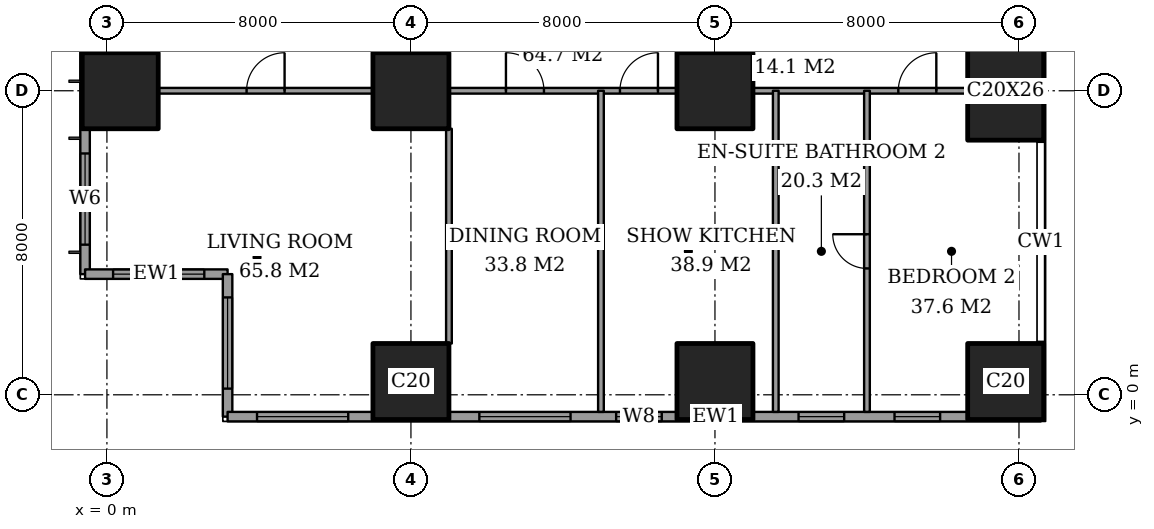
"""IFC4 building model, lengths in metres.
Left out: names, types, materials, properties, quantities, classifications, styles, units other than length and angle.
Written with IfcOpenShell. Run it as: python <this file> out.ifc"""

import sys

from ifc_helpers import new_model, si_unit, direction, frame, frame_2d, origin, origin_2d, place, context, subcontext, project, spatial, rectangle, extrude, element, fill, save


model = new_model("IFC4")
c1 = context("Model", 3, precision=1e-05, world=origin(), true_north=direction((0.0, 1.0)))
c2 = subcontext(c1, "Body", "Model", "MODEL_VIEW")
j1 = project(units=[si_unit("LENGTHUNIT", "METRE"), si_unit("PLANEANGLEUNIT", "RADIAN")], contexts=[c1])
p1 = place(None, origin())
s1 = spatial("IfcSite", under=j1, at=p1, CompositionType="ELEMENT")
p2 = place(p1, origin())
s2 = spatial("IfcBuilding", under=s1, at=p2, CompositionType="ELEMENT")
p3 = place(p2, frame((0.0, 0.0, 40.4)))
s3 = spatial("IfcBuildingStorey", under=s2, at=p3, CompositionType="ELEMENT", Elevation=40.4)
for number, where, z_axis, x_axis in (
    (1, (0.35, 8.0, 0.0), (0.0, 0.0, 1.0), (1.0, 0.0, 0.0)),
    (2, (8.0, 0.35, 0.0), (0.0, 0.0, 1.0), (1.0, 0.0, 0.0)),
    (3, (8.0, 8.0, 0.0), (0.0, 0.0, 1.0), (1.0, 0.0, 0.0)),
    (4, (16.0, 0.35, 0.0), (0.0, 0.0, 1.0), (1.0, 0.0, 0.0)),
    (5, (16.0, 8.0, 0.0), (0.0, 0.0, 1.0), (1.0, 0.0, 0.0)),
    (6, (23.65, 0.35, 0.0), (0.0, 0.0, 1.0), (1.0, 0.0, 0.0)),
):
    element("IfcColumn", number, at=place(p3, frame(where, z_axis=z_axis, x_axis=x_axis)), inside=s3, PredefinedType="COLUMN", context=c2, shape_type="SweptSolid", body=[
        extrude(rectangle(XDim=2.0, YDim=2.0, at=origin_2d()), origin(), (0.0, 0.0, 1.0), 3.6),
    ])
p4 = place(p3, frame((23.65, 8.0, 0.0), z_axis=(0.0, 0.0, 1.0), x_axis=(1.0, 0.0, 0.0)))
e7 = element("IfcColumn", 7, at=p4, inside=s3, PredefinedType="COLUMN", context=c2, shape_type="SweptSolid", body=[
    extrude(rectangle(XDim=2.0, YDim=2.6, at=origin_2d()), origin(), (0.0, 0.0, 1.0), 3.6),
])
p5 = place(p3, frame((-0.575, 44.825, 0.0), z_axis=(0.0, 0.0, 1.0), x_axis=(0.0, -1.0, 0.0)))
e8 = element("IfcWall", 8, at=p5, inside=s3, PredefinedType="SOLIDWALL", context=c2, shape_type="SweptSolid", body=[
    extrude(rectangle(XDim=41.65, YDim=0.25, at=frame_2d((20.825, 0.0))), origin(), (0.0, 0.0, 1.0), 3.6),
])
p6 = place(p5, frame((0.775, 0.0, 0.6)))
e9 = element("IfcOpeningElement", 9, at=p6, cuts=e8, PredefinedType="OPENING", context=c2, shape_type="SweptSolid", body=[
    extrude(rectangle(XDim=2.4, YDim=2.0, at=frame_2d((1.2, 1.0))), frame((0.0, 0.135, 0.0), z_axis=(0.0, -1.0, 0.0), x_axis=(1.0, 0.0, 0.0)), (0.0, 0.0, 1.0), 0.27),
])
p7 = place(p5, frame((6.1, 0.0, 0.6)))
e10 = element("IfcOpeningElement", 10, at=p7, cuts=e8, PredefinedType="OPENING", context=c2, shape_type="SweptSolid", body=[
    extrude(rectangle(XDim=1.2, YDim=2.0, at=frame_2d((0.6, 1.0))), frame((0.0, 0.135, 0.0), z_axis=(0.0, -1.0, 0.0), x_axis=(1.0, 0.0, 0.0)), (0.0, 0.0, 1.0), 0.27),
])
p8 = place(p5, frame((8.425, 0.0, 0.6)))
e11 = element("IfcOpeningElement", 11, at=p8, cuts=e8, PredefinedType="OPENING", context=c2, shape_type="SweptSolid", body=[
    extrude(rectangle(XDim=2.4, YDim=2.0, at=frame_2d((1.2, 1.0))), frame((0.0, 0.135, 0.0), z_axis=(0.0, -1.0, 0.0), x_axis=(1.0, 0.0, 0.0)), (0.0, 0.0, 1.0), 0.27),
])
p9 = place(p5, frame((15.625, 0.0, 0.6)))
e12 = element("IfcOpeningElement", 12, at=p9, cuts=e8, PredefinedType="OPENING", context=c2, shape_type="SweptSolid", body=[
    extrude(rectangle(XDim=2.4, YDim=2.0, at=frame_2d((1.2, 1.0))), frame((0.0, 0.135, 0.0), z_axis=(0.0, -1.0, 0.0), x_axis=(1.0, 0.0, 0.0)), (0.0, 0.0, 1.0), 0.27),
])
p10 = place(p5, frame((23.625, 0.0, 0.6)))
e13 = element("IfcOpeningElement", 13, at=p10, cuts=e8, PredefinedType="OPENING", context=c2, shape_type="SweptSolid", body=[
    extrude(rectangle(XDim=2.4, YDim=2.0, at=frame_2d((1.2, 1.0))), frame((0.0, 0.135, 0.0), z_axis=(0.0, -1.0, 0.0), x_axis=(1.0, 0.0, 0.0)), (0.0, 0.0, 1.0), 0.27),
])
p11 = place(p5, frame((30.825, 0.0, 0.6)))
e14 = element("IfcOpeningElement", 14, at=p11, cuts=e8, PredefinedType="OPENING", context=c2, shape_type="SweptSolid", body=[
    extrude(rectangle(XDim=2.4, YDim=2.0, at=frame_2d((1.2, 1.0))), frame((0.0, 0.135, 0.0), z_axis=(0.0, -1.0, 0.0), x_axis=(1.0, 0.0, 0.0)), (0.0, 0.0, 1.0), 0.27),
])
p12 = place(p5, frame((34.5, 0.0, 0.6)))
e15 = element("IfcOpeningElement", 15, at=p12, cuts=e8, PredefinedType="OPENING", context=c2, shape_type="SweptSolid", body=[
    extrude(rectangle(XDim=1.2, YDim=2.0, at=frame_2d((0.6, 1.0))), frame((0.0, 0.135, 0.0), z_axis=(0.0, -1.0, 0.0), x_axis=(1.0, 0.0, 0.0)), (0.0, 0.0, 1.0), 0.27),
])
p13 = place(p5, frame((38.475, 0.0, 0.6)))
e16 = element("IfcOpeningElement", 16, at=p13, cuts=e8, PredefinedType="OPENING", context=c2, shape_type="SweptSolid", body=[
    extrude(rectangle(XDim=2.4, YDim=2.0, at=frame_2d((1.2, 1.0))), frame((0.0, 0.135, 0.0), z_axis=(0.0, -1.0, 0.0), x_axis=(1.0, 0.0, 0.0)), (0.0, 0.0, 1.0), 0.27),
])
p14 = place(p3, frame((-0.575, 3.175, 0.0), z_axis=(0.0, 0.0, 1.0), x_axis=(1.0, 0.0, 0.0)))
e17 = element("IfcWall", 17, at=p14, inside=s3, PredefinedType="SOLIDWALL", context=c2, shape_type="SweptSolid", body=[
    extrude(rectangle(XDim=3.75, YDim=0.25, at=frame_2d((1.875, 0.0))), origin(), (0.0, 0.0, 1.0), 3.6),
])
p15 = place(p14, frame((0.738, 0.0, 0.6)))
e18 = element("IfcOpeningElement", 18, at=p15, cuts=e17, PredefinedType="OPENING", context=c2, shape_type="SweptSolid", body=[
    extrude(rectangle(XDim=2.4, YDim=2.0, at=frame_2d((1.2, 1.0))), frame((0.0, 0.135, 0.0), z_axis=(0.0, -1.0, 0.0), x_axis=(1.0, 0.0, 0.0)), (0.0, 0.0, 1.0), 0.27),
])
p16 = place(p3, frame((3.175, 3.175, 0.0), z_axis=(0.0, 0.0, 1.0), x_axis=(0.0, -1.0, 0.0)))
e19 = element("IfcWall", 19, at=p16, inside=s3, PredefinedType="SOLIDWALL", context=c2, shape_type="SweptSolid", body=[
    extrude(rectangle(XDim=3.75, YDim=0.25, at=frame_2d((1.875, 0.0))), origin(), (0.0, 0.0, 1.0), 3.6),
])
p17 = place(p16, frame((0.613, 0.0, 0.6)))
e20 = element("IfcOpeningElement", 20, at=p17, cuts=e19, PredefinedType="OPENING", context=c2, shape_type="SweptSolid", body=[
    extrude(rectangle(XDim=2.4, YDim=2.0, at=frame_2d((1.2, 1.0))), frame((0.0, 0.135, 0.0), z_axis=(0.0, -1.0, 0.0), x_axis=(1.0, 0.0, 0.0)), (0.0, 0.0, 1.0), 0.27),
])
p18 = place(p3, frame((3.175, -0.575, 0.0), z_axis=(0.0, 0.0, 1.0), x_axis=(1.0, 0.0, 0.0)))
e21 = element("IfcWall", 21, at=p18, inside=s3, PredefinedType="SOLIDWALL", context=c2, shape_type="SweptSolid", body=[
    extrude(rectangle(XDim=21.4, YDim=0.25, at=frame_2d((10.7, 0.0))), origin(), (0.0, 0.0, 1.0), 3.6),
])
p19 = place(p18, frame((0.775, 0.0, 0.6)))
e22 = element("IfcOpeningElement", 22, at=p19, cuts=e21, PredefinedType="OPENING", context=c2, shape_type="SweptSolid", body=[
    extrude(rectangle(XDim=2.4, YDim=2.0, at=frame_2d((1.2, 1.0))), frame((0.0, 0.135, 0.0), z_axis=(0.0, -1.0, 0.0), x_axis=(1.0, 0.0, 0.0)), (0.0, 0.0, 1.0), 0.27),
])
p20 = place(p18, frame((6.625, 0.0, 0.6)))
e23 = element("IfcOpeningElement", 23, at=p20, cuts=e21, PredefinedType="OPENING", context=c2, shape_type="SweptSolid", body=[
    extrude(rectangle(XDim=2.4, YDim=2.0, at=frame_2d((1.2, 1.0))), frame((0.0, 0.135, 0.0), z_axis=(0.0, -1.0, 0.0), x_axis=(1.0, 0.0, 0.0)), (0.0, 0.0, 1.0), 0.27),
])
p21 = place(p18, frame((10.225, 0.0, 0.6)))
e24 = element("IfcOpeningElement", 24, at=p21, cuts=e21, PredefinedType="OPENING", context=c2, shape_type="SweptSolid", body=[
    extrude(rectangle(XDim=1.2, YDim=2.0, at=frame_2d((0.6, 1.0))), frame((0.0, 0.135, 0.0), z_axis=(0.0, -1.0, 0.0), x_axis=(1.0, 0.0, 0.0)), (0.0, 0.0, 1.0), 0.27),
])
p22 = place(p18, frame((15.025, 0.0, 0.6)))
e25 = element("IfcOpeningElement", 25, at=p22, cuts=e21, PredefinedType="OPENING", context=c2, shape_type="SweptSolid", body=[
    extrude(rectangle(XDim=1.2, YDim=2.0, at=frame_2d((0.6, 1.0))), frame((0.0, 0.135, 0.0), z_axis=(0.0, -1.0, 0.0), x_axis=(1.0, 0.0, 0.0)), (0.0, 0.0, 1.0), 0.27),
])
p23 = place(p18, frame((17.55, 0.0, 0.6)))
e26 = element("IfcOpeningElement", 26, at=p23, cuts=e21, PredefinedType="OPENING", context=c2, shape_type="SweptSolid", body=[
    extrude(rectangle(XDim=1.2, YDim=2.0, at=frame_2d((0.6, 1.0))), frame((0.0, 0.135, 0.0), z_axis=(0.0, -1.0, 0.0), x_axis=(1.0, 0.0, 0.0)), (0.0, 0.0, 1.0), 0.27),
])
p24 = place(p3, frame((1.35, 8.0, 0.0), z_axis=(0.0, 0.0, 1.0), x_axis=(1.0, 0.0, 0.0)))
e27 = element("IfcWall", 27, at=p24, inside=s3, PredefinedType="PARTITIONING", context=c2, shape_type="SweptSolid", body=[
    extrude(rectangle(XDim=5.65, YDim=0.15, at=frame_2d((2.825, 0.0))), origin(), (0.0, 0.0, 1.0), 3.35),
])
p25 = place(p24, frame((2.325, 0.0, 0.0)))
e28 = element("IfcOpeningElement", 28, at=p25, cuts=e27, PredefinedType="OPENING", context=c2, shape_type="SweptSolid", body=[
    extrude(rectangle(XDim=1.0, YDim=2.1, at=frame_2d((0.5, 1.05))), frame((0.0, 0.085, 0.0), z_axis=(0.0, -1.0, 0.0), x_axis=(1.0, 0.0, 0.0)), (0.0, 0.0, 1.0), 0.17),
])
p26 = place(p3, frame((9.0, 8.0, 0.0), z_axis=(0.0, 0.0, 1.0), x_axis=(1.0, 0.0, 0.0)))
e29 = element("IfcWall", 29, at=p26, inside=s3, PredefinedType="PARTITIONING", context=c2, shape_type="SweptSolid", body=[
    extrude(rectangle(XDim=6.0, YDim=0.15, at=frame_2d((3.0, 0.0))), origin(), (0.0, 0.0, 1.0), 3.35),
])
p27 = place(p26, frame((1.5, 0.0, 0.0)))
e30 = element("IfcOpeningElement", 30, at=p27, cuts=e29, PredefinedType="OPENING", context=c2, shape_type="SweptSolid", body=[
    extrude(rectangle(XDim=1.0, YDim=2.1, at=frame_2d((0.5, 1.05))), frame((0.0, 0.085, 0.0), z_axis=(0.0, -1.0, 0.0), x_axis=(1.0, 0.0, 0.0)), (0.0, 0.0, 1.0), 0.17),
])
p28 = place(p26, frame((4.5, 0.0, 0.0)))
e31 = element("IfcOpeningElement", 31, at=p28, cuts=e29, PredefinedType="OPENING", context=c2, shape_type="SweptSolid", body=[
    extrude(rectangle(XDim=1.0, YDim=2.1, at=frame_2d((0.5, 1.05))), frame((0.0, 0.085, 0.0), z_axis=(0.0, -1.0, 0.0), x_axis=(1.0, 0.0, 0.0)), (0.0, 0.0, 1.0), 0.17),
])
p29 = place(p3, frame((17.0, 8.0, 0.0), z_axis=(0.0, 0.0, 1.0), x_axis=(1.0, 0.0, 0.0)))
e32 = element("IfcWall", 32, at=p29, inside=s3, PredefinedType="PARTITIONING", context=c2, shape_type="SweptSolid", body=[
    extrude(rectangle(XDim=5.65, YDim=0.15, at=frame_2d((2.825, 0.0))), origin(), (0.0, 0.0, 1.0), 3.35),
])
p30 = place(p29, frame((3.825, 0.0, 0.0)))
e33 = element("IfcOpeningElement", 33, at=p30, cuts=e32, PredefinedType="OPENING", context=c2, shape_type="SweptSolid", body=[
    extrude(rectangle(XDim=1.0, YDim=2.1, at=frame_2d((0.5, 1.05))), frame((0.0, 0.085, 0.0), z_axis=(0.0, -1.0, 0.0), x_axis=(1.0, 0.0, 0.0)), (0.0, 0.0, 1.0), 0.17),
])
p31 = place(p3, frame((9.0, 1.35, 0.0), z_axis=(0.0, 0.0, 1.0), x_axis=(0.0, 1.0, 0.0)))
e34 = element("IfcWall", 34, at=p31, inside=s3, PredefinedType="PARTITIONING", context=c2, shape_type="SweptSolid", body=[
    extrude(rectangle(XDim=5.65, YDim=0.15, at=frame_2d((2.825, 0.0))), origin(), (0.0, 0.0, 1.0), 3.35),
])
for number, where, z_axis, x_axis in (
    (35, (13.0, -0.45, 0.0), (0.0, 0.0, 1.0), (0.0, 1.0, 0.0)),
    (36, (17.6, -0.45, 0.0), (0.0, 0.0, 1.0), (0.0, 1.0, 0.0)),
):
    element("IfcWall", number, at=place(p3, frame(where, z_axis=z_axis, x_axis=x_axis)), inside=s3, PredefinedType="PARTITIONING", context=c2, shape_type="SweptSolid", body=[
        extrude(rectangle(XDim=8.45, YDim=0.15, at=frame_2d((4.225, 0.0))), origin(), (0.0, 0.0, 1.0), 3.35),
    ])
p32 = place(p3, frame((20.0, -0.45, 0.0), z_axis=(0.0, 0.0, 1.0), x_axis=(0.0, 1.0, 0.0)))
e37 = element("IfcWall", 37, at=p32, inside=s3, PredefinedType="PARTITIONING", context=c2, shape_type="SweptSolid", body=[
    extrude(rectangle(XDim=8.45, YDim=0.15, at=frame_2d((4.225, 0.0))), origin(), (0.0, 0.0, 1.0), 3.35),
])
p33 = place(p32, frame((3.775, 0.0, 0.0)))
e38 = element("IfcOpeningElement", 38, at=p33, cuts=e37, PredefinedType="OPENING", context=c2, shape_type="SweptSolid", body=[
    extrude(rectangle(XDim=0.9, YDim=2.1, at=frame_2d((0.45, 1.05))), frame((0.0, 0.085, 0.0), z_axis=(0.0, -1.0, 0.0), x_axis=(1.0, 0.0, 0.0)), (0.0, 0.0, 1.0), 0.17),
])
p34 = place(p13, origin())
e39 = element("IfcWindow", 39, at=p34, inside=s3, PartitioningType="SINGLE_PANEL", PredefinedType="WINDOW", context=c2, shape_type="SweptSolid", body=[
    extrude(rectangle(XDim=2.4, YDim=2.0, at=frame_2d((1.2, 1.0))), frame((0.0, 0.03, 0.0), z_axis=(0.0, -1.0, 0.0), x_axis=(1.0, 0.0, 0.0)), (0.0, 0.0, 1.0), 0.06),
])
fill(e16, e39)
p35 = place(p15, origin())
e40 = element("IfcWindow", 40, at=p35, inside=s3, PartitioningType="SINGLE_PANEL", PredefinedType="WINDOW", context=c2, shape_type="SweptSolid", body=[
    extrude(rectangle(XDim=2.4, YDim=2.0, at=frame_2d((1.2, 1.0))), frame((0.0, 0.03, 0.0), z_axis=(0.0, -1.0, 0.0), x_axis=(1.0, 0.0, 0.0)), (0.0, 0.0, 1.0), 0.06),
])
fill(e18, e40)
p36 = place(p17, origin())
e41 = element("IfcWindow", 41, at=p36, inside=s3, PartitioningType="SINGLE_PANEL", PredefinedType="WINDOW", context=c2, shape_type="SweptSolid", body=[
    extrude(rectangle(XDim=2.4, YDim=2.0, at=frame_2d((1.2, 1.0))), frame((0.0, 0.03, 0.0), z_axis=(0.0, -1.0, 0.0), x_axis=(1.0, 0.0, 0.0)), (0.0, 0.0, 1.0), 0.06),
])
fill(e20, e41)
p37 = place(p19, origin())
e42 = element("IfcWindow", 42, at=p37, inside=s3, PartitioningType="SINGLE_PANEL", PredefinedType="WINDOW", context=c2, shape_type="SweptSolid", body=[
    extrude(rectangle(XDim=2.4, YDim=2.0, at=frame_2d((1.2, 1.0))), frame((0.0, 0.03, 0.0), z_axis=(0.0, -1.0, 0.0), x_axis=(1.0, 0.0, 0.0)), (0.0, 0.0, 1.0), 0.06),
])
fill(e22, e42)
p38 = place(p20, origin())
e43 = element("IfcWindow", 43, at=p38, inside=s3, PartitioningType="SINGLE_PANEL", PredefinedType="WINDOW", context=c2, shape_type="SweptSolid", body=[
    extrude(rectangle(XDim=2.4, YDim=2.0, at=frame_2d((1.2, 1.0))), frame((0.0, 0.03, 0.0), z_axis=(0.0, -1.0, 0.0), x_axis=(1.0, 0.0, 0.0)), (0.0, 0.0, 1.0), 0.06),
])
fill(e23, e43)
p39 = place(p21, origin())
e44 = element("IfcWindow", 44, at=p39, inside=s3, PartitioningType="SINGLE_PANEL", PredefinedType="WINDOW", context=c2, shape_type="SweptSolid", body=[
    extrude(rectangle(XDim=1.2, YDim=2.0, at=frame_2d((0.6, 1.0))), frame((0.0, 0.03, 0.0), z_axis=(0.0, -1.0, 0.0), x_axis=(1.0, 0.0, 0.0)), (0.0, 0.0, 1.0), 0.06),
])
fill(e24, e44)
p40 = place(p22, origin())
e45 = element("IfcWindow", 45, at=p40, inside=s3, PartitioningType="SINGLE_PANEL", PredefinedType="WINDOW", context=c2, shape_type="SweptSolid", body=[
    extrude(rectangle(XDim=1.2, YDim=2.0, at=frame_2d((0.6, 1.0))), frame((0.0, 0.03, 0.0), z_axis=(0.0, -1.0, 0.0), x_axis=(1.0, 0.0, 0.0)), (0.0, 0.0, 1.0), 0.06),
])
fill(e25, e45)
p41 = place(p23, origin())
e46 = element("IfcWindow", 46, at=p41, inside=s3, PartitioningType="SINGLE_PANEL", PredefinedType="WINDOW", context=c2, shape_type="SweptSolid", body=[
    extrude(rectangle(XDim=1.2, YDim=2.0, at=frame_2d((0.6, 1.0))), frame((0.0, 0.03, 0.0), z_axis=(0.0, -1.0, 0.0), x_axis=(1.0, 0.0, 0.0)), (0.0, 0.0, 1.0), 0.06),
])
fill(e26, e46)
p42 = place(p25, origin())
e47 = element("IfcDoor", 47, at=p42, inside=s3, OperationType="SINGLE_SWING_LEFT", PredefinedType="DOOR", context=c2, shape_type="SweptSolid", body=[
    extrude(rectangle(XDim=1.0, YDim=2.1, at=frame_2d((0.5, 1.05))), frame((0.0, 0.025, 0.0), z_axis=(0.0, -1.0, 0.0), x_axis=(1.0, 0.0, 0.0)), (0.0, 0.0, 1.0), 0.05),
])
fill(e28, e47)
p43 = place(p27, origin())
e48 = element("IfcDoor", 48, at=p43, inside=s3, OperationType="SINGLE_SWING_RIGHT", PredefinedType="DOOR", context=c2, shape_type="SweptSolid", body=[
    extrude(rectangle(XDim=1.0, YDim=2.1, at=frame_2d((0.5, 1.05))), frame((0.0, 0.025, 0.0), z_axis=(0.0, -1.0, 0.0), x_axis=(1.0, 0.0, 0.0)), (0.0, 0.0, 1.0), 0.05),
])
fill(e30, e48)
p44 = place(p28, origin())
e49 = element("IfcDoor", 49, at=p44, inside=s3, OperationType="SINGLE_SWING_LEFT", PredefinedType="DOOR", context=c2, shape_type="SweptSolid", body=[
    extrude(rectangle(XDim=1.0, YDim=2.1, at=frame_2d((0.5, 1.05))), frame((0.0, 0.025, 0.0), z_axis=(0.0, -1.0, 0.0), x_axis=(1.0, 0.0, 0.0)), (0.0, 0.0, 1.0), 0.05),
])
fill(e31, e49)
p45 = place(p33, origin())
e50 = element("IfcDoor", 50, at=p45, inside=s3, OperationType="SINGLE_SWING_LEFT", PredefinedType="DOOR", context=c2, shape_type="SweptSolid", body=[
    extrude(rectangle(XDim=0.9, YDim=2.1, at=frame_2d((0.45, 1.05))), frame((0.0, 0.025, 0.0), z_axis=(0.0, -1.0, 0.0), x_axis=(1.0, 0.0, 0.0)), (0.0, 0.0, 1.0), 0.05),
])
fill(e38, e50)
p46 = place(p30, origin())
e51 = element("IfcDoor", 51, at=p46, inside=s3, OperationType="SINGLE_SWING_LEFT", PredefinedType="DOOR", context=c2, shape_type="SweptSolid", body=[
    extrude(rectangle(XDim=1.0, YDim=2.1, at=frame_2d((0.5, 1.05))), frame((0.0, 0.025, 0.0), z_axis=(0.0, -1.0, 0.0), x_axis=(1.0, 0.0, 0.0)), (0.0, 0.0, 1.0), 0.05),
])
fill(e33, e51)
save(model, sys.argv[1])
